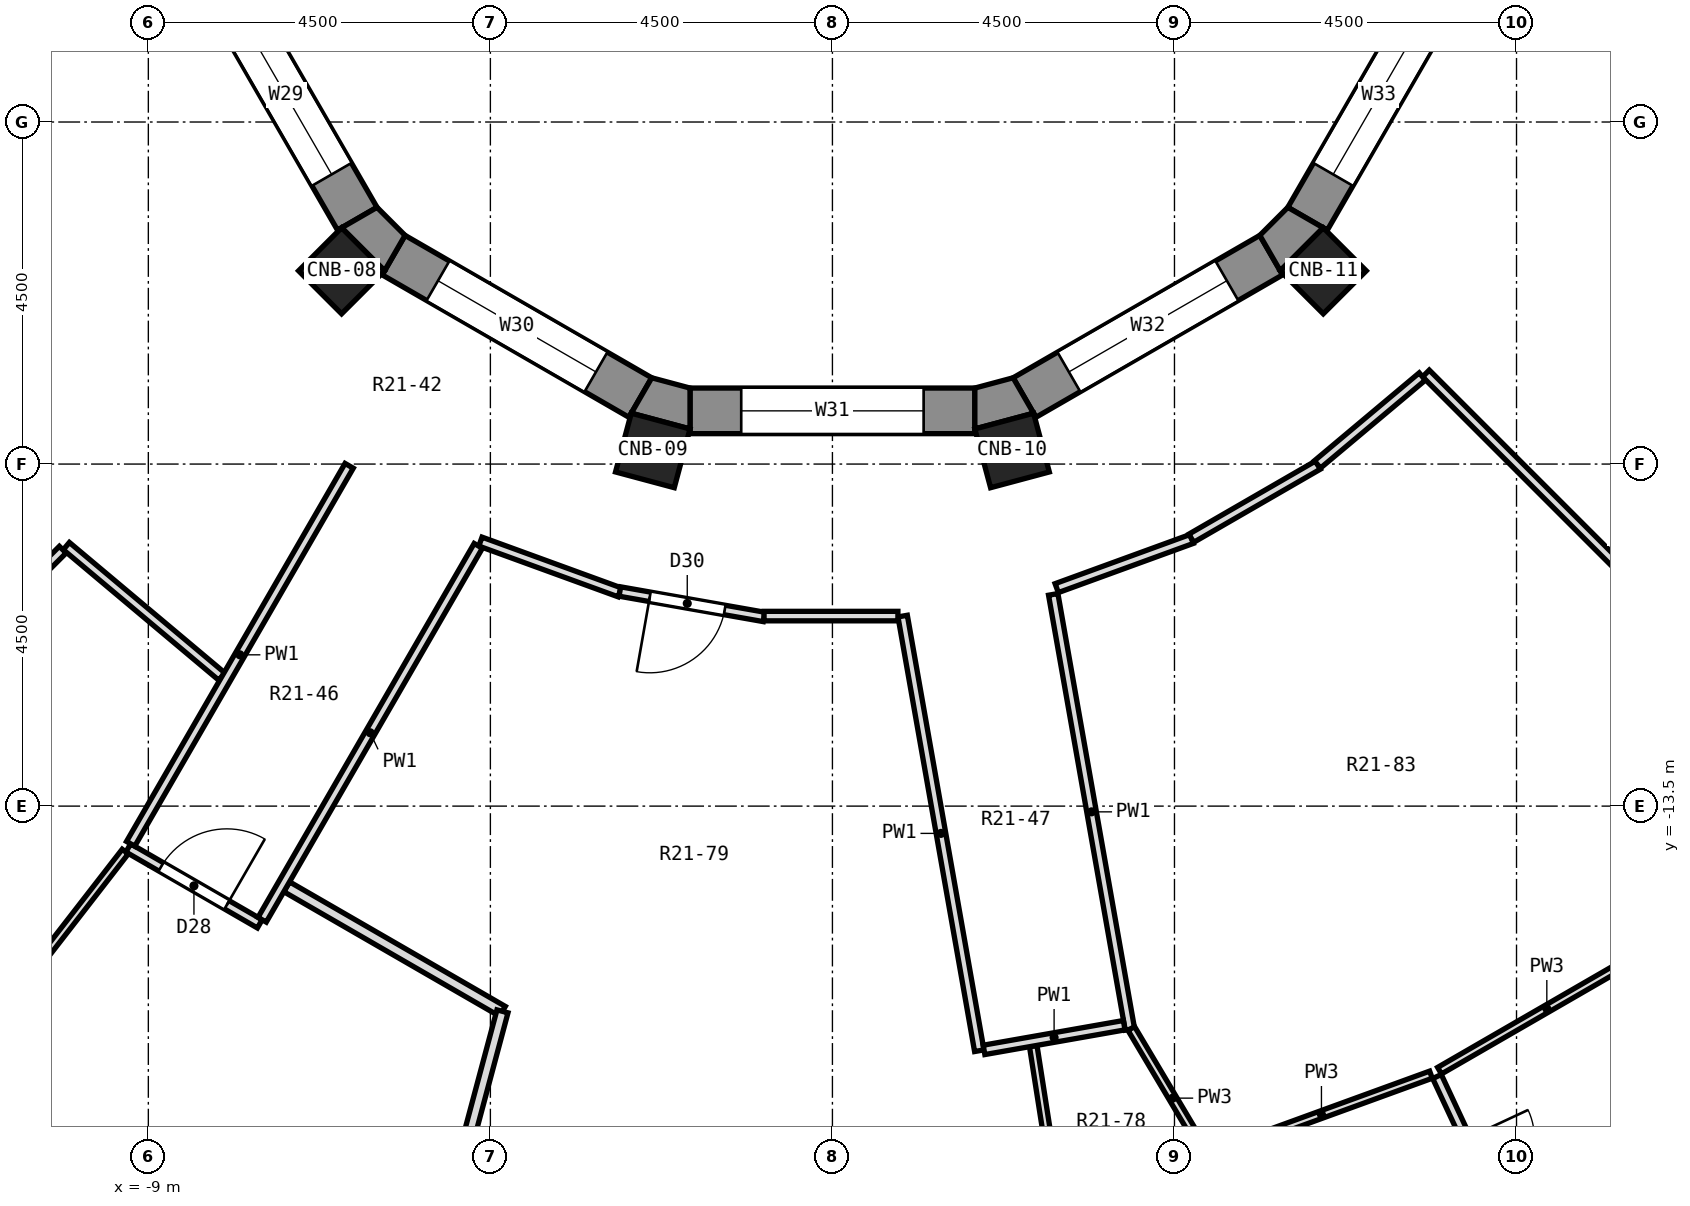
"""IFC4 building model, lengths in metres.
Left out: names, types, materials, properties, quantities, classifications, styles, units other than length and angle.
Written with IfcOpenShell. Run it as: python <this file> out.ifc"""

import sys

from ifc_helpers import new_model, si_unit, direction, frame, frame_2d, origin, origin_2d, place, context, subcontext, project, spatial, polyline, rectangle, outline, extrude, element, fill, save


model = new_model("IFC4")
c1 = context("Model", 3, precision=1e-05, world=origin(), true_north=direction((0.0, 1.0)))
c2 = subcontext(c1, "Body", "Model", "MODEL_VIEW")
j1 = project(units=[si_unit("LENGTHUNIT", "METRE"), si_unit("PLANEANGLEUNIT", "RADIAN")], contexts=[c1])
p1 = place(None, origin())
s1 = spatial("IfcSite", under=j1, at=p1, CompositionType="ELEMENT")
p2 = place(p1, origin())
s2 = spatial("IfcBuilding", under=s1, at=p2, CompositionType="ELEMENT")
p3 = place(p2, frame((0.0, 0.0, 131.5)))
s3 = spatial("IfcBuildingStorey", under=s2, at=p3, CompositionType="ELEMENT", Elevation=131.5)
for number, where, z_axis, x_axis in (
    (1, (-6.458, -6.458, 0.0), (0.0, 0.0, 1.0), (-0.707, -0.707, 0.0)),
    (2, (-2.364, -8.821, 0.0), (0.0, 0.0, 1.0), (-0.259, -0.966, 0.0)),
    (3, (2.364, -8.821, 0.0), (0.0, 0.0, 1.0), (0.259, -0.966, 0.0)),
    (4, (6.458, -6.458, 0.0), (0.0, 0.0, 1.0), (0.707, -0.707, 0.0)),
):
    element("IfcColumn", number, at=place(p3, frame(where, z_axis=z_axis, x_axis=x_axis)), inside=s3, PredefinedType="COLUMN", context=c2, shape_type="SweptSolid", body=[
        extrude(rectangle(XDim=0.8, YDim=0.8, at=origin_2d()), origin(), (0.0, 0.0, 1.0), 3.3),
    ])
p4 = place(p3, frame((-8.125, -2.527, 0.0), z_axis=(0.0, 0.0, 1.0), x_axis=(0.499964958637, -0.86604563398, 0.0)))
e5 = element("IfcWall", 5, at=p4, inside=s3, PredefinedType="SOLIDWALL", context=c2, shape_type="SweptSolid", body=[
    extrude(rectangle(XDim=3.747, YDim=0.6, at=frame_2d((1.874, 0.0))), origin(), (0.0, 0.0, 1.0), 2.8),
])
p5 = place(p4, frame((0.674, 0.0, 0.9)))
e6 = element("IfcOpeningElement", 6, at=p5, cuts=e5, PredefinedType="OPENING", context=c2, shape_type="SweptSolid", body=[
    extrude(rectangle(XDim=2.4, YDim=1.8, at=frame_2d((1.2, 0.9))), frame((0.0, 0.312, 0.0), z_axis=(0.0, -1.0, 0.0), x_axis=(1.0, 0.0, 0.0)), (0.0, 0.0, 1.0), 0.624),
])
p6 = place(p3, frame((-5.773, -6.251, 0.0), z_axis=(0.0, 0.0, 1.0), x_axis=(0.86604563398, -0.499964958637, 0.0)))
e7 = element("IfcWall", 7, at=p6, inside=s3, PredefinedType="SOLIDWALL", context=c2, shape_type="SweptSolid", body=[
    extrude(rectangle(XDim=3.747, YDim=0.6, at=frame_2d((1.874, 0.0))), origin(), (0.0, 0.0, 1.0), 2.8),
])
p7 = place(p6, frame((0.674, 0.0, 0.9)))
e8 = element("IfcOpeningElement", 8, at=p7, cuts=e7, PredefinedType="OPENING", context=c2, shape_type="SweptSolid", body=[
    extrude(rectangle(XDim=2.4, YDim=1.8, at=frame_2d((1.2, 0.9))), frame((0.0, 0.312, 0.0), z_axis=(0.0, -1.0, 0.0), x_axis=(1.0, 0.0, 0.0)), (0.0, 0.0, 1.0), 0.624),
])
p8 = place(p3, frame((-1.874, -8.3, 0.0), z_axis=(0.0, 0.0, 1.0), x_axis=(1.0, 0.0, 0.0)))
e9 = element("IfcWall", 9, at=p8, inside=s3, PredefinedType="SOLIDWALL", context=c2, shape_type="SweptSolid", body=[
    extrude(rectangle(XDim=3.748, YDim=0.6, at=frame_2d((1.874, 0.0))), origin(), (0.0, 0.0, 1.0), 2.8),
])
p9 = place(p8, frame((0.674, 0.0, 0.9)))
e10 = element("IfcOpeningElement", 10, at=p9, cuts=e9, PredefinedType="OPENING", context=c2, shape_type="SweptSolid", body=[
    extrude(rectangle(XDim=2.4, YDim=1.8, at=frame_2d((1.2, 0.9))), frame((0.0, 0.312, 0.0), z_axis=(0.0, -1.0, 0.0), x_axis=(1.0, 0.0, 0.0)), (0.0, 0.0, 1.0), 0.624),
])
p10 = place(p3, frame((2.527, -8.125, 0.0), z_axis=(0.0, 0.0, 1.0), x_axis=(0.86604563398, 0.499964958637, 0.0)))
e11 = element("IfcWall", 11, at=p10, inside=s3, PredefinedType="SOLIDWALL", context=c2, shape_type="SweptSolid", body=[
    extrude(rectangle(XDim=3.747, YDim=0.6, at=frame_2d((1.874, 0.0))), origin(), (0.0, 0.0, 1.0), 2.8),
])
p11 = place(p10, frame((0.674, 0.0, 0.9)))
e12 = element("IfcOpeningElement", 12, at=p11, cuts=e11, PredefinedType="OPENING", context=c2, shape_type="SweptSolid", body=[
    extrude(rectangle(XDim=2.4, YDim=1.8, at=frame_2d((1.2, 0.9))), frame((0.0, 0.312, 0.0), z_axis=(0.0, -1.0, 0.0), x_axis=(1.0, 0.0, 0.0)), (0.0, 0.0, 1.0), 0.624),
])
p12 = place(p3, frame((6.251, -5.773, 0.0), z_axis=(0.0, 0.0, 1.0), x_axis=(0.499964958637, 0.86604563398, 0.0)))
e13 = element("IfcWall", 13, at=p12, inside=s3, PredefinedType="SOLIDWALL", context=c2, shape_type="SweptSolid", body=[
    extrude(rectangle(XDim=3.747, YDim=0.6, at=frame_2d((1.874, 0.0))), origin(), (0.0, 0.0, 1.0), 2.8),
])
p13 = place(p12, frame((0.674, 0.0, 0.9)))
e14 = element("IfcOpeningElement", 14, at=p13, cuts=e13, PredefinedType="OPENING", context=c2, shape_type="SweptSolid", body=[
    extrude(rectangle(XDim=2.4, YDim=1.8, at=frame_2d((1.2, 0.9))), frame((0.0, 0.312, 0.0), z_axis=(0.0, -1.0, 0.0), x_axis=(1.0, 0.0, 0.0)), (0.0, 0.0, 1.0), 0.624),
])
p14 = place(p3, origin())
e15 = element("IfcWall", 15, at=p14, inside=s3, PredefinedType="SOLIDWALL", context=c2, shape_type="SweptSolid", body=[
    extrude(outline(polyline([(-6.458, -5.892), (-5.892, -6.458), (-5.623, -5.991), (-5.991, -5.623), (-6.458, -5.892)])), origin(), (0.0, 0.0, 1.0), 2.8),
])
p15 = place(p3, origin())
e16 = element("IfcWall", 16, at=p15, inside=s3, PredefinedType="SOLIDWALL", context=c2, shape_type="SweptSolid", body=[
    extrude(outline(polyline([(-1.874, -8.538), (-1.874, -8.0), (-2.377, -7.865), (-2.646, -8.331), (-1.874, -8.538)])), origin(), (0.0, 0.0, 1.0), 2.8),
])
p16 = place(p3, origin())
e17 = element("IfcWall", 17, at=p16, inside=s3, PredefinedType="SOLIDWALL", context=c2, shape_type="SweptSolid", body=[
    extrude(outline(polyline([(2.646, -8.331), (2.377, -7.865), (1.874, -8.0), (1.874, -8.538), (2.646, -8.331)])), origin(), (0.0, 0.0, 1.0), 2.8),
])
p17 = place(p3, origin())
e18 = element("IfcWall", 18, at=p17, inside=s3, PredefinedType="SOLIDWALL", context=c2, shape_type="SweptSolid", body=[
    extrude(outline(polyline([(5.892, -6.458), (6.458, -5.892), (5.991, -5.623), (5.623, -5.991), (5.892, -6.458)])), origin(), (0.0, 0.0, 1.0), 2.8),
])
p18 = place(p3, frame((2.642, -16.656, 0.0), z_axis=(0.0, 0.0, 1.0), x_axis=(0.154658266248, -0.987968026143, 0.0)))
e19 = element("IfcWall", 19, at=p18, inside=s3, PredefinedType="PARTITIONING", context=c2, shape_type="SweptSolid", body=[
    extrude(rectangle(XDim=2.038, YDim=0.1, at=frame_2d((1.019, 0.0))), origin(), (0.0, 0.0, 1.0), 2.8),
])
p19 = place(p3, frame((0.924, -11.0, 0.0), z_axis=(0.0, 0.0, 1.0), x_axis=(0.173576639114, -0.98482036451, 0.0)))
e20 = element("IfcWall", 20, at=p19, inside=s3, PredefinedType="PARTITIONING", context=c2, shape_type="SweptSolid", body=[
    extrude(rectangle(XDim=5.806, YDim=0.125, at=frame_2d((2.903, 0.0))), origin(), (0.0, 0.0, 1.0), 2.8),
])
p20 = place(p3, frame((2.905, -10.715, 0.0), z_axis=(0.0, 0.0, 1.0), x_axis=(0.173617542192, -0.984813154382, 0.0)))
e21 = element("IfcWall", 21, at=p20, inside=s3, PredefinedType="PARTITIONING", context=c2, shape_type="SweptSolid", body=[
    extrude(rectangle(XDim=5.81, YDim=0.125, at=frame_2d((2.905, 0.0))), origin(), (0.0, 0.0, 1.0), 2.8),
])
p21 = place(p3, frame((7.954, -17.057, 0.0), z_axis=(0.0, 0.0, 1.0), x_axis=(0.422662835783, -0.906287000485, 0.0)))
e22 = element("IfcWall", 22, at=p21, inside=s3, PredefinedType="PARTITIONING", context=c2, shape_type="SweptSolid", body=[
    extrude(rectangle(XDim=6.844, YDim=0.125, at=frame_2d((3.422, 0.0))), origin(), (0.0, 0.0, 1.0), 2.8),
])
p22 = place(p21, frame((0.905, 0.0, 0.0)))
e23 = element("IfcOpeningElement", 23, at=p22, cuts=e22, PredefinedType="OPENING", context=c2, shape_type="SweptSolid", body=[
    extrude(rectangle(XDim=0.9, YDim=2.1, at=frame_2d((0.45, 1.05))), frame((0.0, 0.074, 0.0), z_axis=(0.0, -1.0, 0.0), x_axis=(1.0, 0.0, 0.0)), (0.0, 0.0, 1.0), 0.149),
])
p23 = place(p3, frame((3.932, -16.426, 0.0), z_axis=(0.0, 0.0, 1.0), x_axis=(0.511292595627, -0.859406703288, 0.0)))
e24 = element("IfcWall", 24, at=p23, inside=s3, PredefinedType="PARTITIONING", context=c2, shape_type="SweptSolid", body=[
    extrude(rectangle(XDim=2.132, YDim=0.1, at=frame_2d((1.066, 0.0))), origin(), (0.0, 0.0, 1.0), 2.8),
])
p24 = place(p3, frame((7.808, -7.808, 0.0), z_axis=(0.0, 0.0, 1.0), x_axis=(0.707106781187, -0.707106781187, 0.0)))
e25 = element("IfcWall", 25, at=p24, inside=s3, PredefinedType="PARTITIONING", context=c2, shape_type="SweptSolid", body=[
    extrude(rectangle(XDim=7.484, YDim=0.125, at=frame_2d((3.742, 0.0))), origin(), (0.0, 0.0, 1.0), 2.8),
])
p25 = place(p3, frame((-10.079, -10.079, 0.0), z_axis=(0.0, 0.0, 1.0), x_axis=(0.766028909875, -0.642806121031, 0.0)))
e26 = element("IfcWall", 26, at=p25, inside=s3, PredefinedType="PARTITIONING", context=c2, shape_type="SweptSolid", body=[
    extrude(rectangle(XDim=2.671, YDim=0.125, at=frame_2d((1.335, 0.0))), origin(), (0.0, 0.0, 1.0), 2.8),
])
p26 = place(p3, frame((-9.264, -14.05, 0.0), z_axis=(0.0, 0.0, 1.0), x_axis=(0.866008543052, -0.500029202507, 0.0)))
e27 = element("IfcWall", 27, at=p26, inside=s3, PredefinedType="PARTITIONING", context=c2, shape_type="SweptSolid", body=[
    extrude(rectangle(XDim=1.998, YDim=0.125, at=frame_2d((0.999, 0.0))), origin(), (0.0, 0.0, 1.0), 2.8),
])
p27 = place(p26, frame((0.498, 0.0, 0.0)))
e28 = element("IfcOpeningElement", 28, at=p27, cuts=e27, PredefinedType="OPENING", context=c2, shape_type="SweptSolid", body=[
    extrude(rectangle(XDim=1.0, YDim=2.1, at=frame_2d((0.5, 1.05))), frame((0.0, 0.074, 0.0), z_axis=(0.0, -1.0, 0.0), x_axis=(1.0, 0.0, 0.0)), (0.0, 0.0, 1.0), 0.149),
])
p28 = place(p3, frame((-7.18, -14.561, 0.0), z_axis=(0.0, 0.0, 1.0), x_axis=(0.866071485186, -0.499920176176, 0.0)))
e29 = element("IfcWall", 29, at=p28, inside=s3, PredefinedType="PARTITIONING", context=c2, shape_type="SweptSolid", body=[
    extrude(rectangle(XDim=3.278, YDim=0.15, at=frame_2d((1.639, 0.0))), origin(), (0.0, 0.0, 1.0), 2.8),
])
p29 = place(p3, frame((-4.631, -10.02, 0.0), z_axis=(0.0, 0.0, 1.0), x_axis=(0.939584951486, -0.342315817545, 0.0)))
e30 = element("IfcWall", 30, at=p29, inside=s3, PredefinedType="PARTITIONING", context=c2, shape_type="SweptSolid", body=[
    extrude(rectangle(XDim=1.951, YDim=0.125, at=frame_2d((0.975, 0.0))), origin(), (0.0, 0.0, 1.0), 2.8),
])
p30 = place(p3, frame((-2.796, -10.677, 0.0), z_axis=(0.0, 0.0, 1.0), x_axis=(0.984830733923, -0.173517795977, 0.0)))
e31 = element("IfcWall", 31, at=p30, inside=s3, PredefinedType="PARTITIONING", context=c2, shape_type="SweptSolid", body=[
    extrude(rectangle(XDim=1.926, YDim=0.125, at=frame_2d((0.963, 0.0))), origin(), (0.0, 0.0, 1.0), 2.8),
])
p31 = place(p30, frame((0.4, 0.0, 0.0)))
e32 = element("IfcOpeningElement", 32, at=p31, cuts=e31, PredefinedType="OPENING", context=c2, shape_type="SweptSolid", body=[
    extrude(rectangle(XDim=1.0, YDim=2.1, at=frame_2d((0.5, 1.05))), frame((0.0, 0.074, 0.0), z_axis=(0.0, -1.0, 0.0), x_axis=(1.0, 0.0, 0.0)), (0.0, 0.0, 1.0), 0.149),
])
p32 = place(p3, frame((-0.899, -11.0, 0.0), z_axis=(0.0, 0.0, 1.0), x_axis=(1.0, 0.0, 0.0)))
e33 = element("IfcWall", 33, at=p32, inside=s3, PredefinedType="PARTITIONING", context=c2, shape_type="SweptSolid", body=[
    extrude(rectangle(XDim=1.761, YDim=0.125, at=frame_2d((0.88, 0.0))), origin(), (0.0, 0.0, 1.0), 2.8),
])
p33 = place(p3, frame((1.995, -16.707, 0.0), z_axis=(0.0, 0.0, 1.0), x_axis=(0.984821606563, 0.173569591941, 0.0)))
e34 = element("IfcWall", 34, at=p33, inside=s3, PredefinedType="PARTITIONING", context=c2, shape_type="SweptSolid", body=[
    extrude(rectangle(XDim=1.872, YDim=0.125, at=frame_2d((0.936, 0.0))), origin(), (0.0, 0.0, 1.0), 2.8),
])
p34 = place(p3, frame((4.992, -18.082, 0.0), z_axis=(0.0, 0.0, 1.0), x_axis=(0.939709725343, 0.341973145284, 0.0)))
e35 = element("IfcWall", 35, at=p34, inside=s3, PredefinedType="PARTITIONING", context=c2, shape_type="SweptSolid", body=[
    extrude(rectangle(XDim=3.067, YDim=0.1, at=frame_2d((1.533, 0.0))), origin(), (0.0, 0.0, 1.0), 2.8),
])
p35 = place(p3, frame((2.951, -10.632, 0.0), z_axis=(0.0, 0.0, 1.0), x_axis=(0.939616011167, 0.342230553222, 0.0)))
e36 = element("IfcWall", 36, at=p35, inside=s3, PredefinedType="PARTITIONING", context=c2, shape_type="SweptSolid", body=[
    extrude(rectangle(XDim=1.89, YDim=0.125, at=frame_2d((0.945, 0.0))), origin(), (0.0, 0.0, 1.0), 2.8),
])
p36 = place(p3, frame((7.987, -16.981, 0.0), z_axis=(0.0, 0.0, 1.0), x_axis=(0.865989766624, 0.500061720293, 0.0)))
e37 = element("IfcWall", 37, at=p36, inside=s3, PredefinedType="PARTITIONING", context=c2, shape_type="SweptSolid", body=[
    extrude(rectangle(XDim=3.26, YDim=0.1, at=frame_2d((1.63, 0.0))), origin(), (0.0, 0.0, 1.0), 2.8),
])
p37 = place(p3, frame((4.721, -9.976, 0.0), z_axis=(0.0, 0.0, 1.0), x_axis=(0.865946867621, 0.500136003959, 0.0)))
e38 = element("IfcWall", 38, at=p37, inside=s3, PredefinedType="PARTITIONING", context=c2, shape_type="SweptSolid", body=[
    extrude(rectangle(XDim=1.925, YDim=0.125, at=frame_2d((0.962, 0.0))), origin(), (0.0, 0.0, 1.0), 2.8),
])
p38 = place(p3, frame((6.381, -9.005, 0.0), z_axis=(0.0, 0.0, 1.0), x_axis=(0.766182926266, 0.642622535785, 0.0)))
e39 = element("IfcWall", 39, at=p38, inside=s3, PredefinedType="PARTITIONING", context=c2, shape_type="SweptSolid", body=[
    extrude(rectangle(XDim=1.8, YDim=0.125, at=frame_2d((0.9, 0.0))), origin(), (0.0, 0.0, 1.0), 2.8),
])
p39 = place(p3, frame((-13.079, -13.079, 0.0), z_axis=(0.0, 0.0, 1.0), x_axis=(0.707106781187, 0.707106781187, 0.0)))
e40 = element("IfcWall", 40, at=p39, inside=s3, PredefinedType="PARTITIONING", context=c2, shape_type="SweptSolid", body=[
    extrude(rectangle(XDim=4.176, YDim=0.125, at=frame_2d((2.088, 0.0))), origin(), (0.0, 0.0, 1.0), 2.8),
])
p40 = place(p39, frame((1.654, 0.0, 0.0)))
e41 = element("IfcOpeningElement", 41, at=p40, cuts=e40, PredefinedType="OPENING", context=c2, shape_type="SweptSolid", body=[
    extrude(rectangle(XDim=0.9, YDim=2.1, at=frame_2d((0.45, 1.05))), frame((0.0, 0.074, 0.0), z_axis=(0.0, -1.0, 0.0), x_axis=(1.0, 0.0, 0.0)), (0.0, 0.0, 1.0), 0.149),
])
p41 = place(p3, frame((-14.691, -21.044, 0.0), z_axis=(0.0, 0.0, 1.0), x_axis=(0.612857497435, 0.79019344963, 0.0)))
e42 = element("IfcWall", 42, at=p41, inside=s3, PredefinedType="PARTITIONING", context=c2, shape_type="SweptSolid", body=[
    extrude(rectangle(XDim=8.79, YDim=0.1, at=frame_2d((4.395, 0.0))), origin(), (0.0, 0.0, 1.0), 2.8),
])
p42 = place(p3, frame((-7.503, -14.995, 0.0), z_axis=(0.0, 0.0, 1.0), x_axis=(0.500436522094, 0.865773230907, 0.0)))
e43 = element("IfcWall", 43, at=p42, inside=s3, PredefinedType="PARTITIONING", context=c2, shape_type="SweptSolid", body=[
    extrude(rectangle(XDim=5.682, YDim=0.125, at=frame_2d((2.841, 0.0))), origin(), (0.0, 0.0, 1.0), 2.8),
])
p43 = place(p3, frame((-9.233, -13.996, 0.0), z_axis=(0.0, 0.0, 1.0), x_axis=(0.500439738106, 0.865771371971, 0.0)))
e44 = element("IfcWall", 44, at=p43, inside=s3, PredefinedType="PARTITIONING", context=c2, shape_type="SweptSolid", body=[
    extrude(rectangle(XDim=5.744, YDim=0.125, at=frame_2d((2.872, 0.0))), origin(), (0.0, 0.0, 1.0), 2.8),
])
p44 = place(p3, frame((-5.569, -20.784, 0.0), z_axis=(0.0, 0.0, 1.0), x_axis=(0.258735228002, 0.965948281116, 0.0)))
e45 = element("IfcWall", 45, at=p44, inside=s3, PredefinedType="PARTITIONING", context=c2, shape_type="SweptSolid", body=[
    extrude(rectangle(XDim=4.745, YDim=0.15, at=frame_2d((2.373, 0.0))), origin(), (0.0, 0.0, 1.0), 2.8),
])
p45 = place(p5, origin())
e46 = element("IfcWindow", 46, at=p45, inside=s3, PartitioningType="SINGLE_PANEL", PredefinedType="WINDOW", context=c2, shape_type="SweptSolid", body=[
    extrude(rectangle(XDim=2.4, YDim=1.8, at=frame_2d((1.2, 0.9))), frame((0.0, -0.12, 0.0), z_axis=(0.0, -1.0, 0.0), x_axis=(1.0, 0.0, 0.0)), (0.0, 0.0, 1.0), 0.06),
])
fill(e6, e46)
p46 = place(p7, origin())
e47 = element("IfcWindow", 47, at=p46, inside=s3, PartitioningType="SINGLE_PANEL", PredefinedType="WINDOW", context=c2, shape_type="SweptSolid", body=[
    extrude(rectangle(XDim=2.4, YDim=1.8, at=frame_2d((1.2, 0.9))), frame((0.0, -0.12, 0.0), z_axis=(0.0, -1.0, 0.0), x_axis=(1.0, 0.0, 0.0)), (0.0, 0.0, 1.0), 0.06),
])
fill(e8, e47)
p47 = place(p9, origin())
e48 = element("IfcWindow", 48, at=p47, inside=s3, PartitioningType="SINGLE_PANEL", PredefinedType="WINDOW", context=c2, shape_type="SweptSolid", body=[
    extrude(rectangle(XDim=2.4, YDim=1.8, at=frame_2d((1.2, 0.9))), frame((0.0, -0.12, 0.0), z_axis=(0.0, -1.0, 0.0), x_axis=(1.0, 0.0, 0.0)), (0.0, 0.0, 1.0), 0.06),
])
fill(e10, e48)
p48 = place(p11, origin())
e49 = element("IfcWindow", 49, at=p48, inside=s3, PartitioningType="SINGLE_PANEL", PredefinedType="WINDOW", context=c2, shape_type="SweptSolid", body=[
    extrude(rectangle(XDim=2.4, YDim=1.8, at=frame_2d((1.2, 0.9))), frame((0.0, -0.12, 0.0), z_axis=(0.0, -1.0, 0.0), x_axis=(1.0, 0.0, 0.0)), (0.0, 0.0, 1.0), 0.06),
])
fill(e12, e49)
p49 = place(p13, origin())
e50 = element("IfcWindow", 50, at=p49, inside=s3, PartitioningType="SINGLE_PANEL", PredefinedType="WINDOW", context=c2, shape_type="SweptSolid", body=[
    extrude(rectangle(XDim=2.4, YDim=1.8, at=frame_2d((1.2, 0.9))), frame((0.0, -0.12, 0.0), z_axis=(0.0, -1.0, 0.0), x_axis=(1.0, 0.0, 0.0)), (0.0, 0.0, 1.0), 0.06),
])
fill(e14, e50)
p50 = place(p27, origin())
e51 = element("IfcDoor", 51, at=p50, inside=s3, OperationType="SINGLE_SWING_RIGHT", PredefinedType="DOOR", context=c2, shape_type="SweptSolid", body=[
    extrude(rectangle(XDim=1.0, YDim=2.1, at=frame_2d((0.5, 1.05))), frame((0.0, 0.025, 0.0), z_axis=(0.0, -1.0, 0.0), x_axis=(1.0, 0.0, 0.0)), (0.0, 0.0, 1.0), 0.05),
])
fill(e28, e51)
p51 = place(p31, frame((1.0, 0.0, 0.0), z_axis=(0.0, 0.0, 1.0), x_axis=(-1.0, 0.0, 0.0)))
e52 = element("IfcDoor", 52, at=p51, inside=s3, OperationType="SINGLE_SWING_RIGHT", PredefinedType="DOOR", context=c2, shape_type="SweptSolid", body=[
    extrude(rectangle(XDim=1.0, YDim=2.1, at=frame_2d((0.5, 1.05))), frame((0.0, 0.025, 0.0), z_axis=(0.0, -1.0, 0.0), x_axis=(1.0, 0.0, 0.0)), (0.0, 0.0, 1.0), 0.05),
])
fill(e32, e52)
save(model, sys.argv[1])
